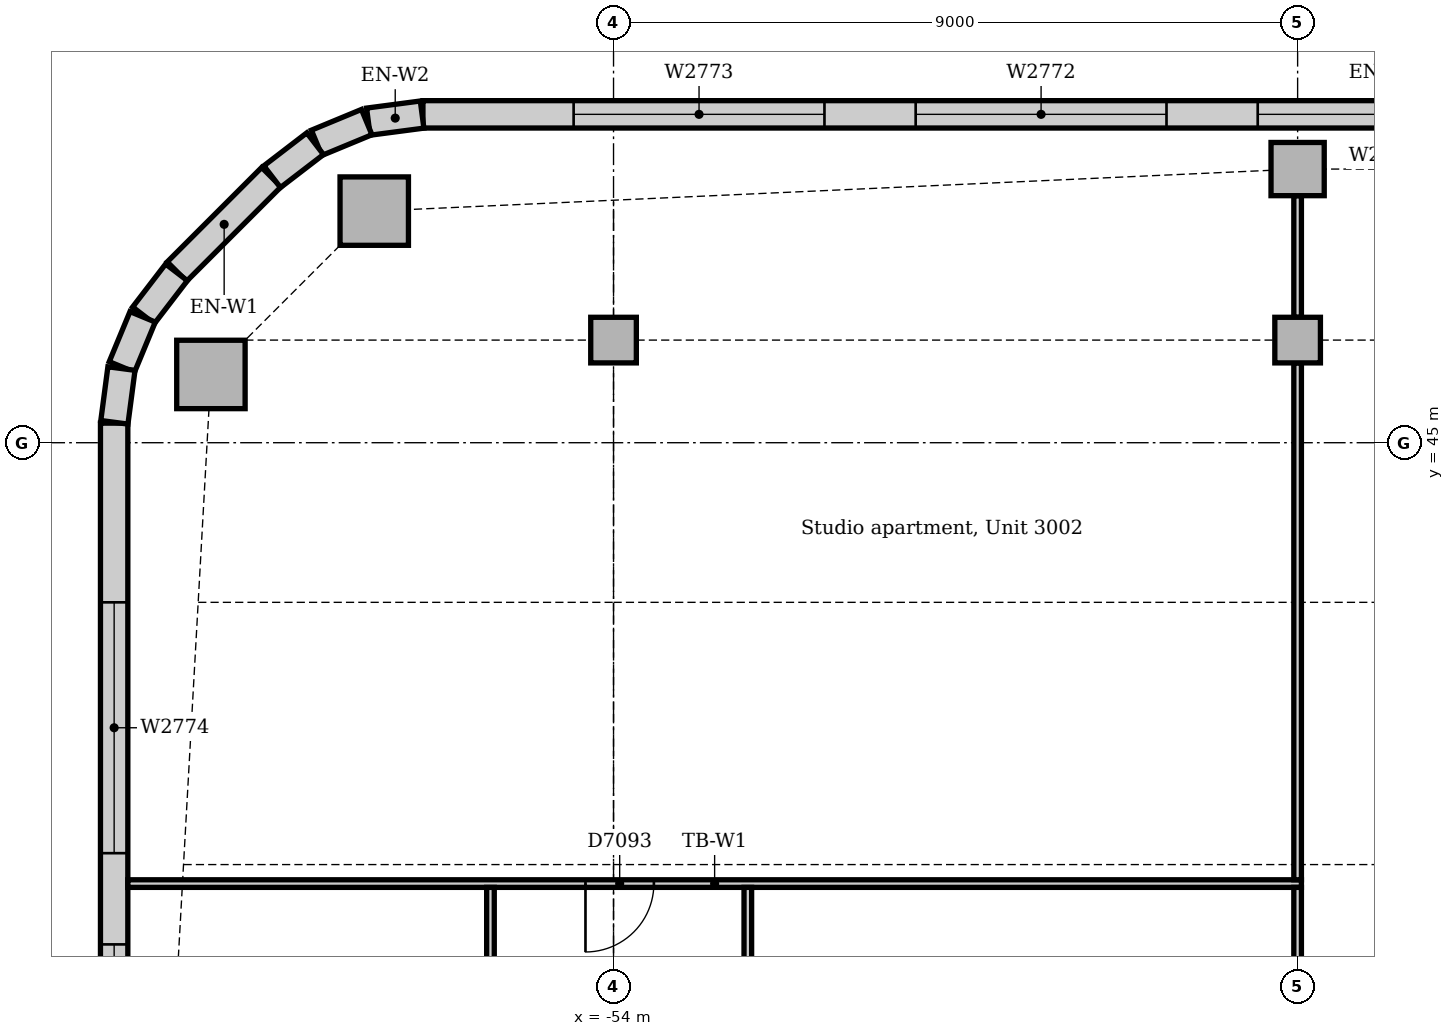
"""IFC4 building model, lengths in metres.
Left out: names, types, materials, properties, quantities, classifications, styles, units other than length and angle.
Written with IfcOpenShell. Run it as: python <this file> out.ifc"""

import sys

from ifc_helpers import new_model, si_unit, direction, frame, frame_2d, origin, origin_2d, place, context, subcontext, project, spatial, rectangle, extrude, element, fill, save


model = new_model("IFC4")
c1 = context("Model", 3, precision=1e-05, world=origin(), true_north=direction((0.0, 1.0)))
c2 = subcontext(c1, "Body", "Model", "MODEL_VIEW")
j1 = project(units=[si_unit("LENGTHUNIT", "METRE"), si_unit("PLANEANGLEUNIT", "RADIAN")], contexts=[c1])
p1 = place(None, origin())
s1 = spatial("IfcSite", under=j1, at=p1, CompositionType="ELEMENT")
p2 = place(p1, origin())
s2 = spatial("IfcBuilding", under=s1, at=p2, CompositionType="ELEMENT")
p3 = place(p2, frame((0.0, 0.0, 128.0)))
s3 = spatial("IfcBuildingStorey", under=s2, at=p3, CompositionType="ELEMENT", Elevation=128.0)
for number, where, z_axis, x_axis in (
    (1, (-57.148, 48.047, 0.0), (0.0, 0.0, 1.0), (1.0, 0.0, 0.0)),
    (2, (-59.297, 45.898, 0.0), (0.0, 0.0, 1.0), (1.0, 0.0, 0.0)),
):
    element("IfcColumn", number, at=place(p3, frame(where, z_axis=z_axis, x_axis=x_axis)), inside=s3, PredefinedType="COLUMN", context=c2, shape_type="SweptSolid", body=[
        extrude(rectangle(XDim=0.9, YDim=0.9, at=origin_2d()), origin(), (0.0, 0.0, 1.0), 3.85),
    ])
p4 = place(p3, frame((-45.0, 48.6, 0.0), z_axis=(0.0, 0.0, 1.0), x_axis=(1.0, 0.0, 0.0)))
e3 = element("IfcColumn", 3, at=p4, inside=s3, PredefinedType="COLUMN", context=c2, shape_type="SweptSolid", body=[
    extrude(rectangle(XDim=0.7, YDim=0.7, at=origin_2d()), origin(), (0.0, 0.0, 1.0), 3.85),
])
for number, where, z_axis, x_axis in (
    (4, (-54.0, 46.35, 0.0), (0.0, 0.0, 1.0), (1.0, 0.0, 0.0)),
    (5, (-45.0, 46.35, 0.0), (0.0, 0.0, 1.0), (1.0, 0.0, 0.0)),
):
    element("IfcColumn", number, at=place(p3, frame(where, z_axis=z_axis, x_axis=x_axis)), inside=s3, PredefinedType="COLUMN", context=c2, shape_type="SweptSolid", body=[
        extrude(rectangle(XDim=0.6, YDim=0.6, at=origin_2d()), origin(), (0.0, 0.0, 1.0), 3.85),
    ])
p5 = place(p3, frame((-31.243, 49.32, 0.0), z_axis=(0.0, 0.0, 1.0), x_axis=(-1.0, 0.0, 0.0)))
e6 = element("IfcWall", 6, at=p5, inside=s3, PredefinedType="STANDARD", context=c2, shape_type="SweptSolid", body=[
    extrude(rectangle(XDim=25.265, YDim=0.36, at=frame_2d((12.632, 0.0))), origin(), (0.0, 0.0, 1.0), 3.85),
])
p6 = place(p5, frame((1.982, 0.0, 0.9)))
e7 = element("IfcOpeningElement", 7, at=p6, cuts=e6, PredefinedType="OPENING", context=c2, shape_type="SweptSolid", body=[
    extrude(rectangle(XDim=3.3, YDim=1.6, at=frame_2d((1.65, 0.8))), frame((0.0, 0.19, 0.0), z_axis=(0.0, -1.0, 0.0), x_axis=(1.0, 0.0, 0.0)), (0.0, 0.0, 1.0), 0.38),
])
p7 = place(p5, frame((6.482, 0.0, 0.9)))
e8 = element("IfcOpeningElement", 8, at=p7, cuts=e6, PredefinedType="OPENING", context=c2, shape_type="SweptSolid", body=[
    extrude(rectangle(XDim=3.3, YDim=1.6, at=frame_2d((1.65, 0.8))), frame((0.0, 0.19, 0.0), z_axis=(0.0, -1.0, 0.0), x_axis=(1.0, 0.0, 0.0)), (0.0, 0.0, 1.0), 0.38),
])
p8 = place(p5, frame((10.982, 0.0, 0.9)))
e9 = element("IfcOpeningElement", 9, at=p8, cuts=e6, PredefinedType="OPENING", context=c2, shape_type="SweptSolid", body=[
    extrude(rectangle(XDim=3.3, YDim=1.6, at=frame_2d((1.65, 0.8))), frame((0.0, 0.19, 0.0), z_axis=(0.0, -1.0, 0.0), x_axis=(1.0, 0.0, 0.0)), (0.0, 0.0, 1.0), 0.38),
])
p9 = place(p5, frame((15.482, 0.0, 0.9)))
e10 = element("IfcOpeningElement", 10, at=p9, cuts=e6, PredefinedType="OPENING", context=c2, shape_type="SweptSolid", body=[
    extrude(rectangle(XDim=3.3, YDim=1.6, at=frame_2d((1.65, 0.8))), frame((0.0, 0.19, 0.0), z_axis=(0.0, -1.0, 0.0), x_axis=(1.0, 0.0, 0.0)), (0.0, 0.0, 1.0), 0.38),
])
p10 = place(p5, frame((19.982, 0.0, 0.9)))
e11 = element("IfcOpeningElement", 11, at=p10, cuts=e6, PredefinedType="OPENING", context=c2, shape_type="SweptSolid", body=[
    extrude(rectangle(XDim=3.3, YDim=1.6, at=frame_2d((1.65, 0.8))), frame((0.0, 0.19, 0.0), z_axis=(0.0, -1.0, 0.0), x_axis=(1.0, 0.0, 0.0)), (0.0, 0.0, 1.0), 0.38),
])
p11 = place(p3, frame((-58.501, 48.494, 0.0), z_axis=(0.0, 0.0, 1.0), x_axis=(-0.707106781187, -0.707106781187, 0.0)))
e12 = element("IfcWall", 12, at=p11, inside=s3, PredefinedType="STANDARD", context=c2, shape_type="SweptSolid", body=[
    extrude(rectangle(XDim=1.757, YDim=0.36, at=frame_2d((0.879, 0.0))), origin(), (0.0, 0.0, 1.0), 3.85),
])
p12 = place(p3, frame((-60.57, 45.257, 0.0), z_axis=(0.0, 0.0, 1.0), x_axis=(0.0, -1.0, 0.0)))
e13 = element("IfcWall", 13, at=p12, inside=s3, PredefinedType="STANDARD", context=c2, shape_type="SweptSolid", body=[
    extrude(rectangle(XDim=21.515, YDim=0.36, at=frame_2d((10.757, 0.0))), origin(), (0.0, 0.0, 1.0), 3.85),
])
p13 = place(p12, frame((2.357, 0.0, 0.9)))
e14 = element("IfcOpeningElement", 14, at=p13, cuts=e13, PredefinedType="OPENING", context=c2, shape_type="SweptSolid", body=[
    extrude(rectangle(XDim=3.3, YDim=1.6, at=frame_2d((1.65, 0.8))), frame((0.0, 0.19, 0.0), z_axis=(0.0, -1.0, 0.0), x_axis=(1.0, 0.0, 0.0)), (0.0, 0.0, 1.0), 0.38),
])
p14 = place(p12, frame((6.857, 0.0, 0.9)))
e15 = element("IfcOpeningElement", 15, at=p14, cuts=e13, PredefinedType="OPENING", context=c2, shape_type="SweptSolid", body=[
    extrude(rectangle(XDim=3.3, YDim=1.6, at=frame_2d((1.65, 0.8))), frame((0.0, 0.19, 0.0), z_axis=(0.0, -1.0, 0.0), x_axis=(1.0, 0.0, 0.0)), (0.0, 0.0, 1.0), 0.38),
])
p15 = place(p12, frame((11.357, 0.0, 0.9)))
e16 = element("IfcOpeningElement", 16, at=p15, cuts=e13, PredefinedType="OPENING", context=c2, shape_type="SweptSolid", body=[
    extrude(rectangle(XDim=3.3, YDim=1.6, at=frame_2d((1.65, 0.8))), frame((0.0, 0.19, 0.0), z_axis=(0.0, -1.0, 0.0), x_axis=(1.0, 0.0, 0.0)), (0.0, 0.0, 1.0), 0.38),
])
p16 = place(p12, frame((15.857, 0.0, 0.9)))
e17 = element("IfcOpeningElement", 17, at=p16, cuts=e13, PredefinedType="OPENING", context=c2, shape_type="SweptSolid", body=[
    extrude(rectangle(XDim=3.3, YDim=1.6, at=frame_2d((1.65, 0.8))), frame((0.0, 0.19, 0.0), z_axis=(0.0, -1.0, 0.0), x_axis=(1.0, 0.0, 0.0)), (0.0, 0.0, 1.0), 0.38),
])
for number, where, z_axis, x_axis in (
    (18, (-56.519, 49.317, 0.0), (0.0, 0.0, 1.0), (-0.991, -0.131, 0.0)),
    (19, (-57.247, 49.218, 0.0), (0.0, 0.0, 1.0), (-0.924, -0.383, 0.0)),
):
    element("IfcWall", number, at=place(p3, frame(where, z_axis=z_axis, x_axis=x_axis)), inside=s3, PredefinedType="STANDARD", context=c2, shape_type="SweptSolid", body=[
        extrude(rectangle(XDim=0.713, YDim=0.36, at=frame_2d((0.356, 0.0))), origin(), (0.0, 0.0, 1.0), 3.85),
    ])
for number, where, z_axis, x_axis in (
    (20, (-57.925, 48.934, 0.0), (0.0, 0.0, 1.0), (-0.793, -0.609, 0.0)),
    (21, (-59.75, 47.241, 0.0), (0.0, 0.0, 1.0), (-0.609, -0.793, 0.0)),
):
    element("IfcWall", number, at=place(p3, frame(where, z_axis=z_axis, x_axis=x_axis)), inside=s3, PredefinedType="STANDARD", context=c2, shape_type="SweptSolid", body=[
        extrude(rectangle(XDim=0.713, YDim=0.36, at=frame_2d((0.357, 0.0))), origin(), (0.0, 0.0, 1.0), 3.85),
    ])
for number, where, z_axis, x_axis in (
    (22, (-60.195, 46.656, 0.0), (0.0, 0.0, 1.0), (-0.383, -0.924, 0.0)),
    (23, (-60.474, 45.976, 0.0), (0.0, 0.0, 1.0), (-0.131, -0.991, 0.0)),
):
    element("IfcWall", number, at=place(p3, frame(where, z_axis=z_axis, x_axis=x_axis)), inside=s3, PredefinedType="STANDARD", context=c2, shape_type="SweptSolid", body=[
        extrude(rectangle(XDim=0.713, YDim=0.36, at=frame_2d((0.356, 0.0))), origin(), (0.0, 0.0, 1.0), 3.85),
    ])
p17 = place(p3, frame((-60.39, 39.2, 0.0), z_axis=(0.0, 0.0, 1.0), x_axis=(1.0, 0.0, 0.0)))
e24 = element("IfcWall", 24, at=p17, inside=s3, PredefinedType="PARTITIONING", context=c2, shape_type="SweptSolid", body=[
    extrude(rectangle(XDim=15.44, YDim=0.1, at=frame_2d((7.72, 0.0))), origin(), (0.0, 0.0, 1.0), 3.85),
])
p18 = place(p17, frame((6.021, 0.0, 0.0)))
e25 = element("IfcOpeningElement", 25, at=p18, cuts=e24, PredefinedType="OPENING", context=c2, shape_type="SweptSolid", body=[
    extrude(rectangle(XDim=0.9, YDim=2.1, at=frame_2d((0.45, 1.05))), frame((0.0, 0.06, 0.0), z_axis=(0.0, -1.0, 0.0), x_axis=(1.0, 0.0, 0.0)), (0.0, 0.0, 1.0), 0.12),
])
p19 = place(p3, frame((-45.0, 39.25, 0.0), z_axis=(0.0, 0.0, 1.0), x_axis=(0.0, 1.0, 0.0)))
e26 = element("IfcWall", 26, at=p19, inside=s3, PredefinedType="PARTITIONING", context=c2, shape_type="SweptSolid", body=[
    extrude(rectangle(XDim=6.8, YDim=0.1, at=frame_2d((3.4, 0.0))), origin(), (0.0, 0.0, 1.0), 3.362),
])
p20 = place(p3, frame((-45.0, 36.3, 0.0), z_axis=(0.0, 0.0, 1.0), x_axis=(0.0, 1.0, 0.0)))
e27 = element("IfcWall", 27, at=p20, inside=s3, PredefinedType="PARTITIONING", context=c2, shape_type="SweptSolid", body=[
    extrude(rectangle(XDim=2.85, YDim=0.1, at=frame_2d((1.425, 0.0))), origin(), (0.0, 0.0, 1.0), 3.362),
])
p21 = place(p3, frame((-45.0, 46.65, 0.0), z_axis=(0.0, 0.0, 1.0), x_axis=(0.0, 1.0, 0.0)))
e28 = element("IfcWall", 28, at=p21, inside=s3, PredefinedType="PARTITIONING", context=c2, shape_type="SweptSolid", body=[
    extrude(rectangle(XDim=1.6, YDim=0.1, at=frame_2d((0.8, 0.0))), origin(), (0.0, 0.0, 1.0), 3.652),
])
p22 = place(p3, frame((-55.619, 36.075, 0.0), z_axis=(0.0, 0.0, 1.0), x_axis=(0.0, 1.0, 0.0)))
e29 = element("IfcWall", 29, at=p22, inside=s3, PredefinedType="PARTITIONING", context=c2, shape_type="SweptSolid", body=[
    extrude(rectangle(XDim=3.075, YDim=0.1, at=frame_2d((1.538, 0.0))), origin(), (0.0, 0.0, 1.0), 3.85),
])
p23 = place(p22, frame((1.1, 0.0, 0.0)))
e30 = element("IfcOpeningElement", 30, at=p23, cuts=e29, PredefinedType="OPENING", context=c2, shape_type="SweptSolid", body=[
    extrude(rectangle(XDim=0.9, YDim=2.1, at=frame_2d((0.45, 1.05))), frame((0.0, 0.06, 0.0), z_axis=(0.0, -1.0, 0.0), x_axis=(1.0, 0.0, 0.0)), (0.0, 0.0, 1.0), 0.12),
])
p24 = place(p3, frame((-52.233, 36.075, 0.0), z_axis=(0.0, 0.0, 1.0), x_axis=(0.0, 1.0, 0.0)))
e31 = element("IfcWall", 31, at=p24, inside=s3, PredefinedType="PARTITIONING", context=c2, shape_type="SweptSolid", body=[
    extrude(rectangle(XDim=3.075, YDim=0.1, at=frame_2d((1.538, 0.0))), origin(), (0.0, 0.0, 1.0), 3.85),
])
p25 = place(p24, frame((1.1, 0.0, 0.0)))
e32 = element("IfcOpeningElement", 32, at=p25, cuts=e31, PredefinedType="OPENING", context=c2, shape_type="SweptSolid", body=[
    extrude(rectangle(XDim=0.9, YDim=2.1, at=frame_2d((0.45, 1.05))), frame((0.0, 0.06, 0.0), z_axis=(0.0, -1.0, 0.0), x_axis=(1.0, 0.0, 0.0)), (0.0, 0.0, 1.0), 0.12),
])
p26 = place(p8, origin())
e33 = element("IfcWindow", 33, at=p26, inside=s3, PartitioningType="SINGLE_PANEL", PredefinedType="WINDOW", context=c2, shape_type="SweptSolid", body=[
    extrude(rectangle(XDim=3.3, YDim=1.6, at=frame_2d((1.65, 0.8))), frame((0.0, 0.13, 0.0), z_axis=(0.0, -1.0, 0.0), x_axis=(1.0, 0.0, 0.0)), (0.0, 0.0, 1.0), 0.06),
])
fill(e9, e33)
p27 = place(p9, origin())
e34 = element("IfcWindow", 34, at=p27, inside=s3, PartitioningType="SINGLE_PANEL", PredefinedType="WINDOW", context=c2, shape_type="SweptSolid", body=[
    extrude(rectangle(XDim=3.3, YDim=1.6, at=frame_2d((1.65, 0.8))), frame((0.0, 0.13, 0.0), z_axis=(0.0, -1.0, 0.0), x_axis=(1.0, 0.0, 0.0)), (0.0, 0.0, 1.0), 0.06),
])
fill(e10, e34)
p28 = place(p10, origin())
e35 = element("IfcWindow", 35, at=p28, inside=s3, PartitioningType="SINGLE_PANEL", PredefinedType="WINDOW", context=c2, shape_type="SweptSolid", body=[
    extrude(rectangle(XDim=3.3, YDim=1.6, at=frame_2d((1.65, 0.8))), frame((0.0, 0.13, 0.0), z_axis=(0.0, -1.0, 0.0), x_axis=(1.0, 0.0, 0.0)), (0.0, 0.0, 1.0), 0.06),
])
fill(e11, e35)
p29 = place(p13, origin())
e36 = element("IfcWindow", 36, at=p29, inside=s3, PartitioningType="SINGLE_PANEL", PredefinedType="WINDOW", context=c2, shape_type="SweptSolid", body=[
    extrude(rectangle(XDim=3.3, YDim=1.6, at=frame_2d((1.65, 0.8))), frame((0.0, 0.13, 0.0), z_axis=(0.0, -1.0, 0.0), x_axis=(1.0, 0.0, 0.0)), (0.0, 0.0, 1.0), 0.06),
])
fill(e14, e36)
p30 = place(p14, origin())
e37 = element("IfcWindow", 37, at=p30, inside=s3, PartitioningType="SINGLE_PANEL", PredefinedType="WINDOW", context=c2, shape_type="SweptSolid", body=[
    extrude(rectangle(XDim=3.3, YDim=1.6, at=frame_2d((1.65, 0.8))), frame((0.0, 0.13, 0.0), z_axis=(0.0, -1.0, 0.0), x_axis=(1.0, 0.0, 0.0)), (0.0, 0.0, 1.0), 0.06),
])
fill(e15, e37)
p31 = place(p18, frame((0.9, 0.0, 0.0), z_axis=(0.0, 0.0, 1.0), x_axis=(-1.0, 0.0, 0.0)))
e38 = element("IfcDoor", 38, at=p31, inside=s3, OperationType="SINGLE_SWING_RIGHT", PredefinedType="DOOR", context=c2, shape_type="SweptSolid", body=[
    extrude(rectangle(XDim=0.9, YDim=2.1, at=frame_2d((0.45, 1.05))), frame((0.0, 0.025, 0.0), z_axis=(0.0, -1.0, 0.0), x_axis=(1.0, 0.0, 0.0)), (0.0, 0.0, 1.0), 0.05),
])
fill(e25, e38)
save(model, sys.argv[1])
